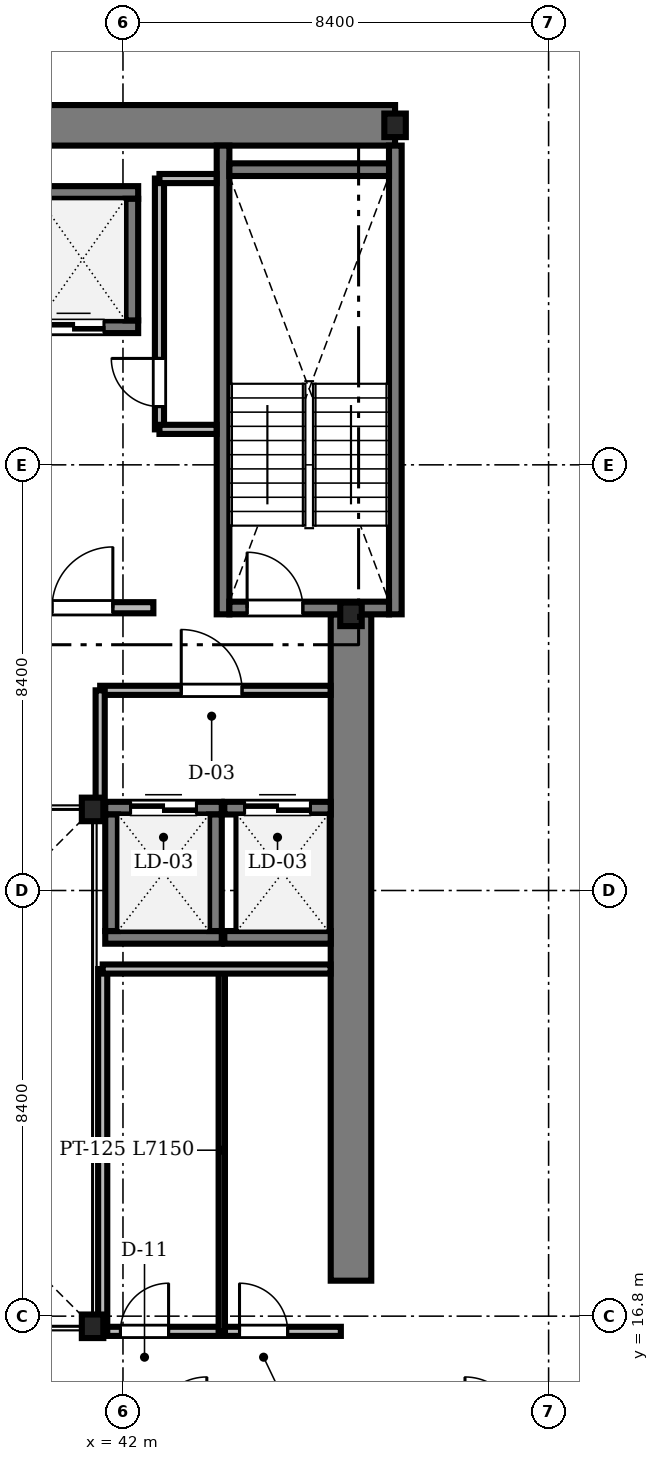
"""IFC4 building model, lengths in metres.
Left out: names, types, materials, properties, quantities, classifications, styles, units other than length and angle.
Written with IfcOpenShell. Run it as: python <this file> out.ifc"""

import sys

from ifc_helpers import new_model, si_unit, direction, frame, frame_2d, origin, origin_2d, place, context, subcontext, project, spatial, rectangle, i_section, extrude, source, transform, mapped, element, fill, save


model = new_model("IFC4")
c1 = context("Model", 3, precision=1e-05, world=origin(), true_north=direction((0.0, 1.0)))
c2 = subcontext(c1, "Body", "Model", "MODEL_VIEW")
j1 = project(units=[si_unit("LENGTHUNIT", "METRE"), si_unit("PLANEANGLEUNIT", "RADIAN")], contexts=[c1])
p1 = place(None, origin())
s1 = spatial("IfcSite", under=j1, at=p1, CompositionType="ELEMENT")
p2 = place(p1, origin())
s2 = spatial("IfcBuilding", under=s1, at=p2, CompositionType="ELEMENT")
p3 = place(p2, frame((0.0, 0.0, 111.3)))
s3 = spatial("IfcBuildingStorey", under=s2, at=p3, CompositionType="ELEMENT", Elevation=111.3)
m1 = source(origin(), c2, "Body", "SweptSolid", [
    extrude(rectangle(XDim=17.52, YDim=0.8, at=frame_2d((8.76, 0.0))), origin(), (0.0, 0.0, 1.0), 3.46),
])
p4 = place(p3, frame((29.85, 40.3, 0.0), z_axis=(0.0, 0.0, 1.0), x_axis=(1.0, 0.0, 0.0)))
e1 = element("IfcWall", 1, at=p4, inside=s3, PredefinedType="SHEAR", context=c2, shape_type="MappedRepresentation", body=[
    mapped(m1, transform((0.0, 0.0, 0.0), scale=1.0)),
])
m2 = source(origin(), c2, "Body", "SweptSolid", [
    extrude(rectangle(XDim=13.15, YDim=0.8, at=frame_2d((6.575, 0.0))), origin(), (0.0, 0.0, 1.0), 3.46),
])
p5 = place(p3, frame((46.5, 17.5, 0.0), z_axis=(0.0, 0.0, 1.0), x_axis=(0.0, 1.0, 0.0)))
e2 = element("IfcWall", 2, at=p5, inside=s3, PredefinedType="SHEAR", context=c2, shape_type="MappedRepresentation", body=[
    mapped(m2, transform((0.0, 0.0, 0.0), scale=1.0)),
])
m3 = source(origin(), c2, "Body", "SweptSolid", [
    extrude(i_section(OverallWidth=0.424, OverallDepth=0.465, WebThickness=0.035, FlangeThickness=0.056, FilletRadius=0.015, at=origin_2d()), origin(), (0.0, 0.0, 1.0), 3.46),
])
for number, where, z_axis, x_axis in (
    (3, (41.4, 16.6, 0.0), (0.0, 0.0, 1.0), (1.0, 0.0, 0.0)),
    (4, (41.4, 26.8, 0.0), (0.0, 0.0, 1.0), (1.0, 0.0, 0.0)),
    (5, (46.5, 30.65, 0.0), (0.0, 0.0, 1.0), (1.0, 0.0, 0.0)),
    (6, (47.37, 40.3, 0.0), (0.0, 0.0, 1.0), (1.0, 0.0, 0.0)),
):
    element("IfcColumn", number, at=place(p3, frame(where, z_axis=z_axis, x_axis=x_axis)), inside=s3, PredefinedType="COLUMN", context=c2, shape_type="MappedRepresentation", body=[
        mapped(m3, transform((0.0, 0.0, 0.0), scale=1.0)),
    ])
m4 = source(origin(), c2, "Body", "SweptSolid", [
    extrude(rectangle(XDim=9.25, YDim=0.25, at=frame_2d((4.625, 0.0))), origin(), (0.0, 0.0, 1.0), 3.5),
])
for number, where, z_axis, x_axis in (
    (7, (43.975, 30.65, 0.0), (0.0, 0.0, 1.0), (0.0, 1.0, 0.0)),
    (8, (47.375, 30.65, 0.0), (0.0, 0.0, 1.0), (0.0, 1.0, 0.0)),
):
    element("IfcWall", number, at=place(p3, frame(where, z_axis=z_axis, x_axis=x_axis)), inside=s3, PredefinedType="SOLIDWALL", context=c2, shape_type="MappedRepresentation", body=[
        mapped(m4, transform((0.0, 0.0, 0.0), scale=1.0)),
    ])
m5 = source(origin(), c2, "Body", "SweptSolid", [
    extrude(rectangle(XDim=3.15, YDim=0.25, at=frame_2d((1.575, 0.0))), origin(), (0.0, 0.0, 1.0), 3.5),
])
p6 = place(p3, frame((44.1, 39.425, 0.0), z_axis=(0.0, 0.0, 1.0), x_axis=(1.0, 0.0, 0.0)))
e9 = element("IfcWall", 9, at=p6, inside=s3, PredefinedType="SOLIDWALL", context=c2, shape_type="MappedRepresentation", body=[
    mapped(m5, transform((0.0, 0.0, 0.0), scale=1.0)),
])
p7 = place(p3, frame((44.1, 30.775, 0.0), z_axis=(0.0, 0.0, 1.0), x_axis=(1.0, 0.0, 0.0)))
e10 = element("IfcWall", 10, at=p7, inside=s3, PredefinedType="SOLIDWALL", context=c2, shape_type="MappedRepresentation", body=[
    mapped(m5, transform((0.0, 0.0, 0.0), scale=1.0)),
])
m6 = source(origin(), c2, "Body", "SweptSolid", [
    extrude(rectangle(XDim=1.1, YDim=2.2, at=frame_2d((0.55, 1.1))), frame((0.0, 0.135, 0.0), z_axis=(0.0, -1.0, 0.0), x_axis=(1.0, 0.0, 0.0)), (0.0, 0.0, 1.0), 0.27),
])
p8 = place(p7, frame((0.35, 0.0, 0.0)))
e11 = element("IfcOpeningElement", 11, at=p8, cuts=e10, PredefinedType="OPENING", context=c2, shape_type="MappedRepresentation", body=[
    mapped(m6, transform((0.0, 0.0, 0.0), scale=1.0)),
])
m7 = source(origin(), c2, "Body", "SweptSolid", [
    extrude(rectangle(XDim=2.8, YDim=0.22, at=frame_2d((1.4, 0.0))), origin(), (0.0, 0.0, 1.0), 3.46),
])
p9 = place(p3, frame((39.8, 30.78, 0.0), z_axis=(0.0, 0.0, 1.0), x_axis=(1.0, 0.0, 0.0)))
e12 = element("IfcWall", 12, at=p9, inside=s3, PredefinedType="SOLIDWALL", context=c2, shape_type="MappedRepresentation", body=[
    mapped(m7, transform((0.0, 0.0, 0.0), scale=1.0)),
])
m8 = source(origin(), c2, "Body", "SweptSolid", [
    extrude(rectangle(XDim=1.2, YDim=2.2, at=frame_2d((0.6, 1.1))), frame((0.0, 0.12, 0.0), z_axis=(0.0, -1.0, 0.0), x_axis=(1.0, 0.0, 0.0)), (0.0, 0.0, 1.0), 0.24),
])
p10 = place(p9, frame((0.8, 0.0, 0.0)))
e13 = element("IfcOpeningElement", 13, at=p10, cuts=e12, PredefinedType="OPENING", context=c2, shape_type="MappedRepresentation", body=[
    mapped(m8, transform((0.0, 0.0, 0.0), scale=1.0)),
])
m9 = source(origin(), c2, "Body", "SweptSolid", [
    extrude(rectangle(XDim=2.55, YDim=0.25, at=frame_2d((1.275, 0.0))), origin(), (0.0, 0.0, 1.0), 3.46),
])
p11 = place(p3, frame((39.75, 36.325, 0.0), z_axis=(0.0, 0.0, 1.0), x_axis=(1.0, 0.0, 0.0)))
e14 = element("IfcWall", 14, at=p11, inside=s3, PredefinedType="SOLIDWALL", context=c2, shape_type="MappedRepresentation", body=[
    mapped(m9, transform((0.0, 0.0, 0.0), scale=1.0)),
])
m10 = source(origin(), c2, "Body", "SweptSolid", [
    extrude(rectangle(XDim=1.2, YDim=2.25, at=frame_2d((0.6, 1.125))), frame((0.0, 0.135, 0.0), z_axis=(0.0, -1.0, 0.0), x_axis=(1.0, 0.0, 0.0)), (0.0, 0.0, 1.0), 0.27),
])
p12 = place(p11, frame((0.675, 0.0, 0.0)))
e15 = element("IfcOpeningElement", 15, at=p12, cuts=e14, PredefinedType="OPENING", context=c2, shape_type="MappedRepresentation", body=[
    mapped(m10, transform((0.0, 0.0, 0.0), scale=1.0)),
])
p13 = place(p3, frame((39.75, 38.975, 0.0), z_axis=(0.0, 0.0, 1.0), x_axis=(1.0, 0.0, 0.0)))
e16 = element("IfcWall", 16, at=p13, inside=s3, PredefinedType="SOLIDWALL", context=c2, shape_type="MappedRepresentation", body=[
    mapped(m9, transform((0.0, 0.0, 0.0), scale=1.0)),
])
m11 = source(origin(), c2, "Body", "SweptSolid", [
    extrude(rectangle(XDim=2.4, YDim=0.25, at=frame_2d((1.2, 0.0))), origin(), (0.0, 0.0, 1.0), 3.46),
])
p14 = place(p3, frame((42.175, 36.45, 0.0), z_axis=(0.0, 0.0, 1.0), x_axis=(0.0, 1.0, 0.0)))
e17 = element("IfcWall", 17, at=p14, inside=s3, PredefinedType="SOLIDWALL", context=c2, shape_type="MappedRepresentation", body=[
    mapped(m11, transform((0.0, 0.0, 0.0), scale=1.0)),
])
m12 = source(origin(), c2, "Body", "SweptSolid", [
    extrude(rectangle(XDim=2.3, YDim=0.25, at=frame_2d((1.15, 0.0))), origin(), (0.0, 0.0, 1.0), 3.46),
])
p15 = place(p3, frame((41.65, 24.275, 0.0), z_axis=(0.0, 0.0, 1.0), x_axis=(1.0, 0.0, 0.0)))
e18 = element("IfcWall", 18, at=p15, inside=s3, PredefinedType="SOLIDWALL", context=c2, shape_type="MappedRepresentation", body=[
    mapped(m12, transform((0.0, 0.0, 0.0), scale=1.0)),
])
p16 = place(p3, frame((41.65, 26.825, 0.0), z_axis=(0.0, 0.0, 1.0), x_axis=(1.0, 0.0, 0.0)))
e19 = element("IfcWall", 19, at=p16, inside=s3, PredefinedType="SOLIDWALL", context=c2, shape_type="MappedRepresentation", body=[
    mapped(m12, transform((0.0, 0.0, 0.0), scale=1.0)),
])
m13 = source(origin(), c2, "Body", "SweptSolid", [
    extrude(rectangle(XDim=1.3, YDim=2.3, at=frame_2d((0.65, 1.15))), frame((0.0, 0.135, 0.0), z_axis=(0.0, -1.0, 0.0), x_axis=(1.0, 0.0, 0.0)), (0.0, 0.0, 1.0), 0.27),
])
p17 = place(p16, frame((0.5, 0.0, 0.0)))
e20 = element("IfcOpeningElement", 20, at=p17, cuts=e19, PredefinedType="OPENING", context=c2, shape_type="MappedRepresentation", body=[
    mapped(m13, transform((0.0, 0.0, 0.0), scale=1.0)),
])
for number, where, z_axis, x_axis in (
    (21, (41.775, 24.4, 0.0), (0.0, 0.0, 1.0), (0.0, 1.0, 0.0)),
    (22, (43.825, 24.4, 0.0), (0.0, 0.0, 1.0), (0.0, 1.0, 0.0)),
):
    element("IfcWall", number, at=place(p3, frame(where, z_axis=z_axis, x_axis=x_axis)), inside=s3, PredefinedType="SOLIDWALL", context=c2, shape_type="MappedRepresentation", body=[
        mapped(m12, transform((0.0, 0.0, 0.0), scale=1.0)),
    ])
m14 = source(origin(), c2, "Body", "SweptSolid", [
    extrude(rectangle(XDim=2.1, YDim=0.25, at=frame_2d((1.05, 0.0))), origin(), (0.0, 0.0, 1.0), 3.46),
])
p18 = place(p3, frame((44.0, 24.275, 0.0), z_axis=(0.0, 0.0, 1.0), x_axis=(1.0, 0.0, 0.0)))
e23 = element("IfcWall", 23, at=p18, inside=s3, PredefinedType="SOLIDWALL", context=c2, shape_type="MappedRepresentation", body=[
    mapped(m14, transform((0.0, 0.0, 0.0), scale=1.0)),
])
p19 = place(p3, frame((44.0, 26.825, 0.0), z_axis=(0.0, 0.0, 1.0), x_axis=(1.0, 0.0, 0.0)))
e24 = element("IfcWall", 24, at=p19, inside=s3, PredefinedType="SOLIDWALL", context=c2, shape_type="MappedRepresentation", body=[
    mapped(m14, transform((0.0, 0.0, 0.0), scale=1.0)),
])
p20 = place(p19, frame((0.4, 0.0, 0.0)))
e25 = element("IfcOpeningElement", 25, at=p20, cuts=e24, PredefinedType="OPENING", context=c2, shape_type="MappedRepresentation", body=[
    mapped(m13, transform((0.0, 0.0, 0.0), scale=1.0)),
])
m15 = source(origin(), c2, "Body", "SweptSolid", [
    extrude(rectangle(XDim=4.95, YDim=0.18, at=frame_2d((2.475, 0.0))), origin(), (0.0, 0.0, 1.0), 3.46),
])
p21 = place(p3, frame((42.72, 34.3, 0.0), z_axis=(0.0, 0.0, 1.0), x_axis=(0.0, 1.0, 0.0)))
e26 = element("IfcWall", 26, at=p21, inside=s3, PredefinedType="PARTITIONING", context=c2, shape_type="MappedRepresentation", body=[
    mapped(m15, transform((0.0, 0.0, 0.0), scale=1.0)),
])
m16 = source(origin(), c2, "Body", "SweptSolid", [
    extrude(rectangle(XDim=0.95, YDim=2.15, at=frame_2d((0.475, 1.075))), frame((0.0, 0.1, 0.0), z_axis=(0.0, -1.0, 0.0), x_axis=(1.0, 0.0, 0.0)), (0.0, 0.0, 1.0), 0.2),
])
p22 = place(p21, frame((0.45, 0.0, 0.0)))
e27 = element("IfcOpeningElement", 27, at=p22, cuts=e26, PredefinedType="OPENING", context=c2, shape_type="MappedRepresentation", body=[
    mapped(m16, transform((0.0, 0.0, 0.0), scale=1.0)),
])
m17 = source(origin(), c2, "Body", "SweptSolid", [
    extrude(rectangle(XDim=4.548, YDim=0.18, at=frame_2d((2.274, 0.0))), origin(), (0.0, 0.0, 1.0), 3.092),
])
p23 = place(p3, frame((41.55, 29.15, 0.0), z_axis=(0.0, 0.0, 1.0), x_axis=(1.0, 0.0, 0.0)))
e28 = element("IfcWall", 28, at=p23, inside=s3, PredefinedType="PARTITIONING", context=c2, shape_type="MappedRepresentation", body=[
    mapped(m17, transform((0.0, 0.0, 0.0), scale=1.0)),
])
m18 = source(origin(), c2, "Body", "SweptSolid", [
    extrude(rectangle(XDim=1.2, YDim=2.2, at=frame_2d((0.6, 1.1))), frame((0.0, 0.1, 0.0), z_axis=(0.0, -1.0, 0.0), x_axis=(1.0, 0.0, 0.0)), (0.0, 0.0, 1.0), 0.2),
])
p24 = place(p23, frame((1.6, 0.0, 0.0)))
e29 = element("IfcOpeningElement", 29, at=p24, cuts=e28, PredefinedType="OPENING", context=c2, shape_type="MappedRepresentation", body=[
    mapped(m18, transform((0.0, 0.0, 0.0), scale=1.0)),
])
m19 = source(origin(), c2, "Body", "SweptSolid", [
    extrude(rectangle(XDim=4.7, YDim=0.18, at=frame_2d((2.35, 0.0))), origin(), (0.0, 0.0, 1.0), 2.852),
])
p25 = place(p3, frame((41.6, 16.5, 0.0), z_axis=(0.0, 0.0, 1.0), x_axis=(1.0, 0.0, 0.0)))
e30 = element("IfcWall", 30, at=p25, inside=s3, PredefinedType="PARTITIONING", context=c2, shape_type="MappedRepresentation", body=[
    mapped(m19, transform((0.0, 0.0, 0.0), scale=1.0)),
])
p26 = place(p25, frame((0.35, 0.0, 0.0)))
e31 = element("IfcOpeningElement", 31, at=p26, cuts=e30, PredefinedType="OPENING", context=c2, shape_type="MappedRepresentation", body=[
    mapped(m16, transform((0.0, 0.0, 0.0), scale=1.0)),
])
p27 = place(p25, frame((2.7, 0.0, 0.0)))
e32 = element("IfcOpeningElement", 32, at=p27, cuts=e30, PredefinedType="OPENING", context=c2, shape_type="MappedRepresentation", body=[
    mapped(m16, transform((0.0, 0.0, 0.0), scale=1.0)),
])
m20 = source(origin(), c2, "Body", "SweptSolid", [
    extrude(rectangle(XDim=7.15, YDim=0.18, at=frame_2d((3.575, 0.0))), origin(), (0.0, 0.0, 1.0), 2.852),
])
p28 = place(p3, frame((41.6, 16.5, 0.0), z_axis=(0.0, 0.0, 1.0), x_axis=(0.0, 1.0, 0.0)))
e33 = element("IfcWall", 33, at=p28, inside=s3, PredefinedType="PARTITIONING", context=c2, shape_type="MappedRepresentation", body=[
    mapped(m20, transform((0.0, 0.0, 0.0), scale=1.0)),
])
m21 = source(origin(), c2, "Body", "SweptSolid", [
    extrude(rectangle(XDim=7.15, YDim=0.125, at=frame_2d((3.575, 0.0))), origin(), (0.0, 0.0, 1.0), 2.852),
])
p29 = place(p3, frame((43.95, 16.5, 0.0), z_axis=(0.0, 0.0, 1.0), x_axis=(0.0, 1.0, 0.0)))
e34 = element("IfcWall", 34, at=p29, inside=s3, PredefinedType="PARTITIONING", context=c2, shape_type="MappedRepresentation", body=[
    mapped(m21, transform((0.0, 0.0, 0.0), scale=1.0)),
])
m22 = source(origin(), c2, "Body", "SweptSolid", [
    extrude(rectangle(XDim=4.498, YDim=0.18, at=frame_2d((2.249, 0.0))), origin(), (0.0, 0.0, 1.0), 3.46),
])
p30 = place(p3, frame((41.6, 23.65, 0.0), z_axis=(0.0, 0.0, 1.0), x_axis=(1.0, 0.0, 0.0)))
e35 = element("IfcWall", 35, at=p30, inside=s3, PredefinedType="PARTITIONING", context=c2, shape_type="MappedRepresentation", body=[
    mapped(m22, transform((0.0, 0.0, 0.0), scale=1.0)),
])
m23 = source(origin(), c2, "Body", "SweptSolid", [
    extrude(rectangle(XDim=2.35, YDim=0.18, at=frame_2d((1.175, 0.0))), origin(), (0.0, 0.0, 1.0), 2.852),
])
p31 = place(p3, frame((41.55, 26.8, 0.0), z_axis=(0.0, 0.0, 1.0), x_axis=(0.0, 1.0, 0.0)))
e36 = element("IfcWall", 36, at=p31, inside=s3, PredefinedType="PARTITIONING", context=c2, shape_type="MappedRepresentation", body=[
    mapped(m23, transform((0.0, 0.0, 0.0), scale=1.0)),
])
m24 = source(origin(), c2, "Body", "SweptSolid", [
    extrude(rectangle(XDim=1.128, YDim=0.18, at=frame_2d((0.564, 0.0))), origin(), (0.0, 0.0, 1.0), 3.46),
])
for number, where, z_axis, x_axis in (
    (37, (42.72, 34.3, 0.0), (0.0, 0.0, 1.0), (1.0, 0.0, 0.0)),
    (38, (42.72, 39.25, 0.0), (0.0, 0.0, 1.0), (1.0, 0.0, 0.0)),
):
    element("IfcWall", number, at=place(p3, frame(where, z_axis=z_axis, x_axis=x_axis)), inside=s3, PredefinedType="PARTITIONING", context=c2, shape_type="MappedRepresentation", body=[
        mapped(m24, transform((0.0, 0.0, 0.0), scale=1.0)),
    ])
m25 = source(origin(), c2, "Body", "SweptSolid", [
    extrude(rectangle(XDim=1.1, YDim=2.2, at=frame_2d((0.55, 1.1))), frame((0.0, 0.025, 0.0), z_axis=(0.0, -1.0, 0.0), x_axis=(1.0, 0.0, 0.0)), (0.0, 0.0, 1.0), 0.05),
])
p32 = place(p8, origin())
e39 = element("IfcDoor", 39, at=p32, inside=s3, OperationType="SINGLE_SWING_LEFT", PredefinedType="DOOR", context=c2, shape_type="MappedRepresentation", body=[
    mapped(m25, transform((0.0, 0.0, 0.0), scale=1.0)),
])
fill(e11, e39)
m26 = source(origin(), c2, "Body", "SweptSolid", [
    extrude(rectangle(XDim=1.2, YDim=2.2, at=frame_2d((0.6, 1.1))), frame((0.0, 0.025, 0.0), z_axis=(0.0, -1.0, 0.0), x_axis=(1.0, 0.0, 0.0)), (0.0, 0.0, 1.0), 0.05),
])
p33 = place(p10, origin())
e40 = element("IfcDoor", 40, at=p33, inside=s3, OperationType="SINGLE_SWING_RIGHT", PredefinedType="DOOR", context=c2, shape_type="MappedRepresentation", body=[
    mapped(m26, transform((0.0, 0.0, 0.0), scale=1.0)),
])
fill(e13, e40)
m27 = source(origin(), c2, "Body", "SweptSolid", [
    extrude(rectangle(XDim=1.2, YDim=2.25, at=frame_2d((0.6, 1.125))), frame((0.0, 0.025, 0.0), z_axis=(0.0, -1.0, 0.0), x_axis=(1.0, 0.0, 0.0)), (0.0, 0.0, 1.0), 0.05),
])
p34 = place(p12, origin())
e41 = element("IfcDoor", 41, at=p34, inside=s3, OperationType="DOUBLE_DOOR_SLIDING", PredefinedType="DOOR", context=c2, shape_type="MappedRepresentation", body=[
    mapped(m27, transform((0.0, 0.0, 0.0), scale=1.0)),
])
fill(e15, e41)
m28 = source(origin(), c2, "Body", "SweptSolid", [
    extrude(rectangle(XDim=1.3, YDim=2.3, at=frame_2d((0.65, 1.15))), frame((0.0, 0.025, 0.0), z_axis=(0.0, -1.0, 0.0), x_axis=(1.0, 0.0, 0.0)), (0.0, 0.0, 1.0), 0.05),
])
p35 = place(p17, origin())
e42 = element("IfcDoor", 42, at=p35, inside=s3, OperationType="DOUBLE_DOOR_SLIDING", PredefinedType="DOOR", context=c2, shape_type="MappedRepresentation", body=[
    mapped(m28, transform((0.0, 0.0, 0.0), scale=1.0)),
])
fill(e20, e42)
p36 = place(p20, origin())
e43 = element("IfcDoor", 43, at=p36, inside=s3, OperationType="DOUBLE_DOOR_SLIDING", PredefinedType="DOOR", context=c2, shape_type="MappedRepresentation", body=[
    mapped(m28, transform((0.0, 0.0, 0.0), scale=1.0)),
])
fill(e25, e43)
m29 = source(origin(), c2, "Body", "SweptSolid", [
    extrude(rectangle(XDim=0.95, YDim=2.15, at=frame_2d((0.475, 1.075))), frame((0.0, 0.025, 0.0), z_axis=(0.0, -1.0, 0.0), x_axis=(1.0, 0.0, 0.0)), (0.0, 0.0, 1.0), 0.05),
])
p37 = place(p22, origin())
e44 = element("IfcDoor", 44, at=p37, inside=s3, OperationType="SINGLE_SWING_RIGHT", PredefinedType="DOOR", context=c2, shape_type="MappedRepresentation", body=[
    mapped(m29, transform((0.0, 0.0, 0.0), scale=1.0)),
])
fill(e27, e44)
p38 = place(p24, origin())
e45 = element("IfcDoor", 45, at=p38, inside=s3, OperationType="SINGLE_SWING_LEFT", PredefinedType="DOOR", context=c2, shape_type="MappedRepresentation", body=[
    mapped(m26, transform((0.0, 0.0, 0.0), scale=1.0)),
])
fill(e29, e45)
p39 = place(p26, origin())
e46 = element("IfcDoor", 46, at=p39, inside=s3, OperationType="SINGLE_SWING_RIGHT", PredefinedType="DOOR", context=c2, shape_type="MappedRepresentation", body=[
    mapped(m29, transform((0.0, 0.0, 0.0), scale=1.0)),
])
fill(e31, e46)
p40 = place(p27, origin())
e47 = element("IfcDoor", 47, at=p40, inside=s3, OperationType="SINGLE_SWING_LEFT", PredefinedType="DOOR", context=c2, shape_type="MappedRepresentation", body=[
    mapped(m29, transform((0.0, 0.0, 0.0), scale=1.0)),
])
fill(e32, e47)
save(model, sys.argv[1])
